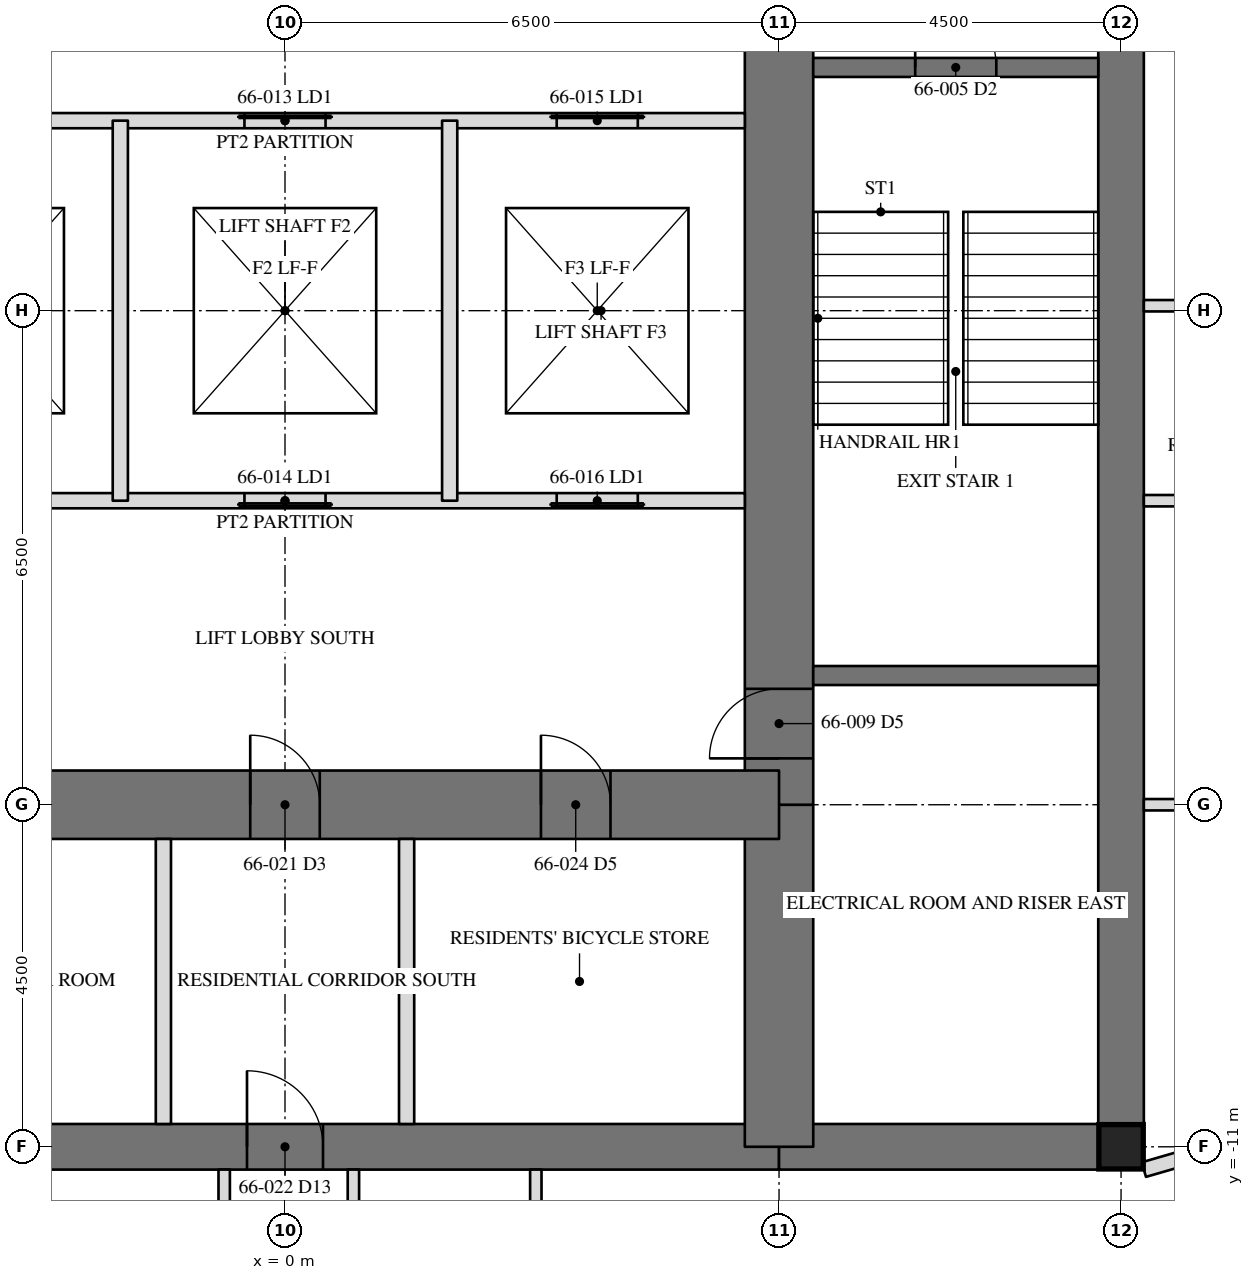
"""IFC4 building model, lengths in metres.
Left out: names, types, materials, properties, quantities, classifications, styles, units other than length and angle.
Written with IfcOpenShell. Run it as: python <this file> out.ifc"""

import sys

from ifc_helpers import new_model, si_unit, direction, frame, frame_2d, origin, origin_2d, place, context, subcontext, project, spatial, rectangle, hollow_rectangle, extrude, element, fill, save


model = new_model("IFC4")
c1 = context("Model", 3, precision=1e-05, world=origin(), true_north=direction((0.0, 1.0)))
c2 = subcontext(c1, "Body", "Model", "MODEL_VIEW")
j1 = project(units=[si_unit("LENGTHUNIT", "METRE"), si_unit("PLANEANGLEUNIT", "RADIAN")], contexts=[c1])
p1 = place(None, origin())
s1 = spatial("IfcSite", under=j1, at=p1, CompositionType="ELEMENT")
p2 = place(p1, origin())
s2 = spatial("IfcBuilding", under=s1, at=p2, CompositionType="ELEMENT")
p3 = place(p2, frame((0.0, 0.0, 270.4)))
s3 = spatial("IfcBuildingStorey", under=s2, at=p3, CompositionType="ELEMENT", Elevation=270.4)
p4 = place(p3, frame((11.0, -11.0, 0.0), z_axis=(0.0, 0.0, 1.0), x_axis=(0.0, 1.0, 0.0)))
e1 = element("IfcWall", 1, at=p4, inside=s3, PredefinedType="SHEAR", context=c2, shape_type="SweptSolid", body=[
    extrude(rectangle(XDim=22.0, YDim=0.6, at=frame_2d((11.0, 0.0))), origin(), (0.0, 0.0, 1.0), 3.6),
])
p5 = place(p4, frame((15.393, 0.0, 0.0)))
e2 = element("IfcOpeningElement", 2, at=p5, cuts=e1, PredefinedType="OPENING", context=c2, shape_type="SweptSolid", body=[
    extrude(rectangle(XDim=0.915, YDim=2.134, at=frame_2d((0.458, 1.067))), frame((0.0, 0.31, 0.0), z_axis=(0.0, -1.0, 0.0), x_axis=(1.0, 0.0, 0.0)), (0.0, 0.0, 1.0), 0.62),
])
p6 = place(p3, frame((-6.5, -11.0, 0.0), z_axis=(0.0, 0.0, 1.0), x_axis=(1.0, 0.0, 0.0)))
e3 = element("IfcWall", 3, at=p6, inside=s3, PredefinedType="SHEAR", context=c2, shape_type="SweptSolid", body=[
    extrude(rectangle(XDim=13.0, YDim=0.6, at=frame_2d((6.5, 0.0))), origin(), (0.0, 0.0, 1.0), 3.6),
])
p7 = place(p6, frame((6.0, 0.0, 0.0)))
e4 = element("IfcOpeningElement", 4, at=p7, cuts=e3, PredefinedType="OPENING", context=c2, shape_type="SweptSolid", body=[
    extrude(rectangle(XDim=1.0, YDim=2.134, at=frame_2d((0.5, 1.067))), frame((0.0, 0.31, 0.0), z_axis=(0.0, -1.0, 0.0), x_axis=(1.0, 0.0, 0.0)), (0.0, 0.0, 1.0), 0.62),
])
p8 = place(p3, frame((6.5, -11.0, 0.0), z_axis=(0.0, 0.0, 1.0), x_axis=(1.0, 0.0, 0.0)))
e5 = element("IfcWall", 5, at=p8, inside=s3, PredefinedType="SHEAR", context=c2, shape_type="SweptSolid", body=[
    extrude(rectangle(XDim=4.5, YDim=0.6, at=frame_2d((2.25, 0.0))), origin(), (0.0, 0.0, 1.0), 3.6),
])
p9 = place(p3, frame((6.5, -11.0, 0.0), z_axis=(0.0, 0.0, 1.0), x_axis=(0.0, 1.0, 0.0)))
e6 = element("IfcWall", 6, at=p9, inside=s3, PredefinedType="SHEAR", context=c2, shape_type="SweptSolid", body=[
    extrude(rectangle(XDim=4.5, YDim=0.9, at=frame_2d((2.25, 0.0))), origin(), (0.0, 0.0, 1.0), 3.6),
])
p10 = place(p3, frame((6.5, -6.5, 0.0), z_axis=(0.0, 0.0, 1.0), x_axis=(0.0, 1.0, 0.0)))
e7 = element("IfcWall", 7, at=p10, inside=s3, PredefinedType="SHEAR", context=c2, shape_type="SweptSolid", body=[
    extrude(rectangle(XDim=13.0, YDim=0.9, at=frame_2d((6.5, 0.0))), origin(), (0.0, 0.0, 1.0), 3.6),
])
p11 = place(p10, frame((10.893, 0.0, 0.0)))
e8 = element("IfcOpeningElement", 8, at=p11, cuts=e7, PredefinedType="OPENING", context=c2, shape_type="SweptSolid", body=[
    extrude(rectangle(XDim=0.915, YDim=2.134, at=frame_2d((0.458, 1.067))), frame((0.0, 0.46, 0.0), z_axis=(0.0, -1.0, 0.0), x_axis=(1.0, 0.0, 0.0)), (0.0, 0.0, 1.0), 0.92),
])
p12 = place(p10, frame((0.61, 0.0, 0.0)))
e9 = element("IfcOpeningElement", 9, at=p12, cuts=e7, PredefinedType="OPENING", context=c2, shape_type="SweptSolid", body=[
    extrude(rectangle(XDim=0.915, YDim=2.134, at=frame_2d((0.458, 1.067))), frame((0.0, 0.46, 0.0), z_axis=(0.0, -1.0, 0.0), x_axis=(1.0, 0.0, 0.0)), (0.0, 0.0, 1.0), 0.92),
])
p13 = place(p3, frame((-6.5, -6.5, 0.0), z_axis=(0.0, 0.0, 1.0), x_axis=(1.0, 0.0, 0.0)))
e10 = element("IfcWall", 10, at=p13, inside=s3, PredefinedType="SHEAR", context=c2, shape_type="SweptSolid", body=[
    extrude(rectangle(XDim=13.0, YDim=0.9, at=frame_2d((6.5, 0.0))), origin(), (0.0, 0.0, 1.0), 3.6),
])
p14 = place(p13, frame((6.042, 0.0, 0.0)))
e11 = element("IfcOpeningElement", 11, at=p14, cuts=e10, PredefinedType="OPENING", context=c2, shape_type="SweptSolid", body=[
    extrude(rectangle(XDim=0.915, YDim=2.134, at=frame_2d((0.458, 1.067))), frame((0.0, 0.46, 0.0), z_axis=(0.0, -1.0, 0.0), x_axis=(1.0, 0.0, 0.0)), (0.0, 0.0, 1.0), 0.92),
])
p15 = place(p13, frame((2.218, 0.0, 0.0)))
e12 = element("IfcOpeningElement", 12, at=p15, cuts=e10, PredefinedType="OPENING", context=c2, shape_type="SweptSolid", body=[
    extrude(rectangle(XDim=0.915, YDim=2.134, at=frame_2d((0.458, 1.067))), frame((0.0, 0.46, 0.0), z_axis=(0.0, -1.0, 0.0), x_axis=(1.0, 0.0, 0.0)), (0.0, 0.0, 1.0), 0.92),
])
p16 = place(p13, frame((9.867, 0.0, 0.0)))
e13 = element("IfcOpeningElement", 13, at=p16, cuts=e10, PredefinedType="OPENING", context=c2, shape_type="SweptSolid", body=[
    extrude(rectangle(XDim=0.915, YDim=2.134, at=frame_2d((0.458, 1.067))), frame((0.0, 0.46, 0.0), z_axis=(0.0, -1.0, 0.0), x_axis=(1.0, 0.0, 0.0)), (0.0, 0.0, 1.0), 0.92),
])
p17 = place(p3, frame((11.0, -11.0, 0.0), z_axis=(0.0, 0.0, 1.0), x_axis=(1.0, 0.0, 0.0)))
e14 = element("IfcColumn", 14, at=p17, inside=s3, PredefinedType="COLUMN", context=c2, shape_type="SweptSolid", body=[
    extrude(hollow_rectangle(XDim=0.584, YDim=0.584, WallThickness=0.051, at=origin_2d()), origin(), (0.0, 0.0, 1.0), 3.6),
])
p18 = place(p3, frame((6.95, -4.8, 0.0), z_axis=(0.0, 0.0, 1.0), x_axis=(1.0, 0.0, 0.0)))
e15 = element("IfcWall", 15, at=p18, inside=s3, PredefinedType="SOLIDWALL", context=c2, shape_type="SweptSolid", body=[
    extrude(rectangle(XDim=3.75, YDim=0.25, at=frame_2d((1.875, 0.0))), origin(), (0.0, 0.0, 1.0), 3.41),
])
p19 = place(p3, frame((6.95, 3.2, 0.0), z_axis=(0.0, 0.0, 1.0), x_axis=(1.0, 0.0, 0.0)))
e16 = element("IfcWall", 16, at=p19, inside=s3, PredefinedType="SOLIDWALL", context=c2, shape_type="SweptSolid", body=[
    extrude(rectangle(XDim=3.75, YDim=0.25, at=frame_2d((1.875, 0.0))), origin(), (0.0, 0.0, 1.0), 3.41),
])
p20 = place(p19, frame((1.342, 0.0, 0.0)))
e17 = element("IfcOpeningElement", 17, at=p20, cuts=e16, PredefinedType="OPENING", context=c2, shape_type="SweptSolid", body=[
    extrude(rectangle(XDim=1.067, YDim=2.134, at=frame_2d((0.533, 1.067))), frame((0.0, 0.135, 0.0), z_axis=(0.0, -1.0, 0.0), x_axis=(1.0, 0.0, 0.0)), (0.0, 0.0, 1.0), 0.27),
])
p21 = place(p3, frame((-6.05, 2.5, 0.0), z_axis=(0.0, 0.0, 1.0), x_axis=(1.0, 0.0, 0.0)))
e18 = element("IfcWall", 18, at=p21, inside=s3, PredefinedType="PARTITIONING", context=c2, shape_type="SweptSolid", body=[
    extrude(rectangle(XDim=12.1, YDim=0.2, at=frame_2d((6.05, 0.0))), origin(), (0.0, 0.0, 1.0), 3.41),
])
p22 = place(p21, frame((1.408, 0.0, 0.0)))
e19 = element("IfcOpeningElement", 19, at=p22, cuts=e18, PredefinedType="OPENING", context=c2, shape_type="SweptSolid", body=[
    extrude(rectangle(XDim=1.067, YDim=2.134, at=frame_2d((0.533, 1.067))), frame((0.0, 0.11, 0.0), z_axis=(0.0, -1.0, 0.0), x_axis=(1.0, 0.0, 0.0)), (0.0, 0.0, 1.0), 0.22),
])
p23 = place(p21, frame((5.517, 0.0, 0.0)))
e20 = element("IfcOpeningElement", 20, at=p23, cuts=e18, PredefinedType="OPENING", context=c2, shape_type="SweptSolid", body=[
    extrude(rectangle(XDim=1.067, YDim=2.134, at=frame_2d((0.533, 1.067))), frame((0.0, 0.11, 0.0), z_axis=(0.0, -1.0, 0.0), x_axis=(1.0, 0.0, 0.0)), (0.0, 0.0, 1.0), 0.22),
])
p24 = place(p21, frame((9.625, 0.0, 0.0)))
e21 = element("IfcOpeningElement", 21, at=p24, cuts=e18, PredefinedType="OPENING", context=c2, shape_type="SweptSolid", body=[
    extrude(rectangle(XDim=1.067, YDim=2.134, at=frame_2d((0.533, 1.067))), frame((0.0, 0.11, 0.0), z_axis=(0.0, -1.0, 0.0), x_axis=(1.0, 0.0, 0.0)), (0.0, 0.0, 1.0), 0.22),
])
p25 = place(p3, frame((6.05, -2.5, 0.0), z_axis=(0.0, 0.0, 1.0), x_axis=(-1.0, 0.0, 0.0)))
e22 = element("IfcWall", 22, at=p25, inside=s3, PredefinedType="PARTITIONING", context=c2, shape_type="SweptSolid", body=[
    extrude(rectangle(XDim=12.1, YDim=0.2, at=frame_2d((6.05, 0.0))), origin(), (0.0, 0.0, 1.0), 3.41),
])
p26 = place(p25, frame((9.625, 0.0, 0.0)))
e23 = element("IfcOpeningElement", 23, at=p26, cuts=e22, PredefinedType="OPENING", context=c2, shape_type="SweptSolid", body=[
    extrude(rectangle(XDim=1.067, YDim=2.134, at=frame_2d((0.533, 1.067))), frame((0.0, 0.11, 0.0), z_axis=(0.0, -1.0, 0.0), x_axis=(1.0, 0.0, 0.0)), (0.0, 0.0, 1.0), 0.22),
])
p27 = place(p25, frame((5.517, 0.0, 0.0)))
e24 = element("IfcOpeningElement", 24, at=p27, cuts=e22, PredefinedType="OPENING", context=c2, shape_type="SweptSolid", body=[
    extrude(rectangle(XDim=1.067, YDim=2.134, at=frame_2d((0.533, 1.067))), frame((0.0, 0.11, 0.0), z_axis=(0.0, -1.0, 0.0), x_axis=(1.0, 0.0, 0.0)), (0.0, 0.0, 1.0), 0.22),
])
p28 = place(p25, frame((1.408, 0.0, 0.0)))
e25 = element("IfcOpeningElement", 25, at=p28, cuts=e22, PredefinedType="OPENING", context=c2, shape_type="SweptSolid", body=[
    extrude(rectangle(XDim=1.067, YDim=2.134, at=frame_2d((0.533, 1.067))), frame((0.0, 0.11, 0.0), z_axis=(0.0, -1.0, 0.0), x_axis=(1.0, 0.0, 0.0)), (0.0, 0.0, 1.0), 0.22),
])
for number, where, z_axis, x_axis in (
    (26, (-2.167, -2.5, 0.0), (0.0, 0.0, 1.0), (0.0, 1.0, 0.0)),
    (27, (2.167, -2.5, 0.0), (0.0, 0.0, 1.0), (0.0, 1.0, 0.0)),
):
    element("IfcWall", number, at=place(p3, frame(where, z_axis=z_axis, x_axis=x_axis)), inside=s3, PredefinedType="PARTITIONING", context=c2, shape_type="SweptSolid", body=[
        extrude(rectangle(XDim=5.0, YDim=0.2, at=frame_2d((2.5, 0.0))), origin(), (0.0, 0.0, 1.0), 3.41),
    ])
for number, where, z_axis, x_axis in (
    (28, (-1.6, -6.95, 0.0), (0.0, 0.0, 1.0), (0.0, -1.0, 0.0)),
    (29, (1.6, -6.95, 0.0), (0.0, 0.0, 1.0), (0.0, -1.0, 0.0)),
):
    element("IfcWall", number, at=place(p3, frame(where, z_axis=z_axis, x_axis=x_axis)), inside=s3, PredefinedType="PARTITIONING", context=c2, shape_type="SweptSolid", body=[
        extrude(rectangle(XDim=3.75, YDim=0.2, at=frame_2d((1.875, 0.0))), origin(), (0.0, 0.0, 1.0), 3.41),
    ])
p29 = place(p3, frame((11.3, -11.3, 0.0), z_axis=(0.0, 0.0, 1.0), x_axis=(0.960552344683, 0.278099250491, 0.0)))
e30 = element("IfcWall", 30, at=p29, inside=s3, PredefinedType="PARTITIONING", context=c2, shape_type="SweptSolid", body=[
    extrude(rectangle(XDim=1.584, YDim=0.2, at=frame_2d((0.792, 0.0))), origin(), (0.0, 0.0, 1.0), 3.41),
])
p30 = place(p3, frame((11.3, -6.5, 0.0), z_axis=(0.0, 0.0, 1.0), x_axis=(1.0, 0.0, 0.0)))
e31 = element("IfcWall", 31, at=p30, inside=s3, PredefinedType="PARTITIONING", context=c2, shape_type="SweptSolid", body=[
    extrude(rectangle(XDim=5.615, YDim=0.15, at=frame_2d((2.808, 0.0))), origin(), (0.0, 0.0, 1.0), 2.966),
])
p31 = place(p30, frame((2.742, 0.0, 0.0)))
e32 = element("IfcOpeningElement", 32, at=p31, cuts=e31, PredefinedType="OPENING", context=c2, shape_type="SweptSolid", body=[
    extrude(rectangle(XDim=0.915, YDim=2.134, at=frame_2d((0.458, 1.067))), frame((0.0, 0.085, 0.0), z_axis=(0.0, -1.0, 0.0), x_axis=(1.0, 0.0, 0.0)), (0.0, 0.0, 1.0), 0.17),
])
p32 = place(p3, frame((11.3, 0.065, 0.0), z_axis=(0.0, 0.0, 1.0), x_axis=(1.0, 0.0, 0.0)))
e33 = element("IfcWall", 33, at=p32, inside=s3, PredefinedType="PARTITIONING", context=c2, shape_type="SweptSolid", body=[
    extrude(rectangle(XDim=5.615, YDim=0.15, at=frame_2d((2.808, 0.0))), origin(), (0.0, 0.0, 1.0), 2.709),
])
p33 = place(p32, frame((3.242, 0.0, 0.0)))
e34 = element("IfcOpeningElement", 34, at=p33, cuts=e33, PredefinedType="OPENING", context=c2, shape_type="SweptSolid", body=[
    extrude(rectangle(XDim=0.915, YDim=2.134, at=frame_2d((0.458, 1.067))), frame((0.0, 0.085, 0.0), z_axis=(0.0, -1.0, 0.0), x_axis=(1.0, 0.0, 0.0)), (0.0, 0.0, 1.0), 0.17),
])
p34 = place(p3, frame((11.3, -2.5, 0.0), z_axis=(0.0, 0.0, 1.0), x_axis=(1.0, 0.0, 0.0)))
e35 = element("IfcWall", 35, at=p34, inside=s3, PredefinedType="PARTITIONING", context=c2, shape_type="SweptSolid", body=[
    extrude(rectangle(XDim=2.375, YDim=0.15, at=frame_2d((1.188, 0.0))), origin(), (0.0, 0.0, 1.0), 3.41),
])
p35 = place(p3, frame((0.9, -11.3, 0.0), z_axis=(0.0, 0.0, 1.0), x_axis=(0.0, -1.0, 0.0)))
e36 = element("IfcWall", 36, at=p35, inside=s3, PredefinedType="PARTITIONING", context=c2, shape_type="SweptSolid", body=[
    extrude(rectangle(XDim=2.725, YDim=0.15, at=frame_2d((1.362, 0.0))), origin(), (0.0, 0.0, 1.0), 3.41),
])
p36 = place(p3, frame((3.3, -11.3, 0.0), z_axis=(0.0, 0.0, 1.0), x_axis=(0.0, -1.0, 0.0)))
e37 = element("IfcWall", 37, at=p36, inside=s3, PredefinedType="PARTITIONING", context=c2, shape_type="SweptSolid", body=[
    extrude(rectangle(XDim=2.725, YDim=0.15, at=frame_2d((1.362, 0.0))), origin(), (0.0, 0.0, 1.0), 2.709),
])
p37 = place(p3, frame((-0.8, -11.3, 0.0), z_axis=(0.0, 0.0, 1.0), x_axis=(0.0, -1.0, 0.0)))
e38 = element("IfcWall", 38, at=p37, inside=s3, PredefinedType="PARTITIONING", context=c2, shape_type="SweptSolid", body=[
    extrude(rectangle(XDim=2.375, YDim=0.15, at=frame_2d((1.188, 0.0))), origin(), (0.0, 0.0, 1.0), 3.41),
])
p38 = place(p20, origin())
e39 = element("IfcDoor", 39, at=p38, inside=s3, OperationType="SINGLE_SWING_LEFT", PredefinedType="DOOR", context=c2, shape_type="SweptSolid", body=[
    extrude(rectangle(XDim=1.067, YDim=2.134, at=frame_2d((0.533, 1.067))), frame((0.0, 0.025, 0.0), z_axis=(0.0, -1.0, 0.0), x_axis=(1.0, 0.0, 0.0)), (0.0, 0.0, 1.0), 0.05),
])
fill(e17, e39)
p39 = place(p12, origin())
e40 = element("IfcDoor", 40, at=p39, inside=s3, OperationType="SINGLE_SWING_RIGHT", PredefinedType="DOOR", context=c2, shape_type="SweptSolid", body=[
    extrude(rectangle(XDim=0.915, YDim=2.134, at=frame_2d((0.458, 1.067))), frame((0.0, -0.375, 0.0), z_axis=(0.0, -1.0, 0.0), x_axis=(1.0, 0.0, 0.0)), (0.0, 0.0, 1.0), 0.05),
])
fill(e9, e40)
p40 = place(p23, origin())
e41 = element("IfcDoor", 41, at=p40, inside=s3, OperationType="SLIDING_TO_LEFT", PredefinedType="DOOR", context=c2, shape_type="SweptSolid", body=[
    extrude(rectangle(XDim=1.067, YDim=2.134, at=frame_2d((0.533, 1.067))), frame((0.0, 0.025, 0.0), z_axis=(0.0, -1.0, 0.0), x_axis=(1.0, 0.0, 0.0)), (0.0, 0.0, 1.0), 0.05),
])
fill(e20, e41)
p41 = place(p27, origin())
e42 = element("IfcDoor", 42, at=p41, inside=s3, OperationType="SLIDING_TO_LEFT", PredefinedType="DOOR", context=c2, shape_type="SweptSolid", body=[
    extrude(rectangle(XDim=1.067, YDim=2.134, at=frame_2d((0.533, 1.067))), frame((0.0, 0.025, 0.0), z_axis=(0.0, -1.0, 0.0), x_axis=(1.0, 0.0, 0.0)), (0.0, 0.0, 1.0), 0.05),
])
fill(e24, e42)
p42 = place(p24, origin())
e43 = element("IfcDoor", 43, at=p42, inside=s3, OperationType="SLIDING_TO_LEFT", PredefinedType="DOOR", context=c2, shape_type="SweptSolid", body=[
    extrude(rectangle(XDim=1.067, YDim=2.134, at=frame_2d((0.533, 1.067))), frame((0.0, 0.025, 0.0), z_axis=(0.0, -1.0, 0.0), x_axis=(1.0, 0.0, 0.0)), (0.0, 0.0, 1.0), 0.05),
])
fill(e21, e43)
p43 = place(p28, origin())
e44 = element("IfcDoor", 44, at=p43, inside=s3, OperationType="SLIDING_TO_LEFT", PredefinedType="DOOR", context=c2, shape_type="SweptSolid", body=[
    extrude(rectangle(XDim=1.067, YDim=2.134, at=frame_2d((0.533, 1.067))), frame((0.0, 0.025, 0.0), z_axis=(0.0, -1.0, 0.0), x_axis=(1.0, 0.0, 0.0)), (0.0, 0.0, 1.0), 0.05),
])
fill(e25, e44)
p44 = place(p14, origin())
e45 = element("IfcDoor", 45, at=p44, inside=s3, OperationType="SINGLE_SWING_RIGHT", PredefinedType="DOOR", context=c2, shape_type="SweptSolid", body=[
    extrude(rectangle(XDim=0.915, YDim=2.134, at=frame_2d((0.458, 1.067))), frame((0.0, -0.375, 0.0), z_axis=(0.0, -1.0, 0.0), x_axis=(1.0, 0.0, 0.0)), (0.0, 0.0, 1.0), 0.05),
])
fill(e11, e45)
p45 = place(p7, origin())
e46 = element("IfcDoor", 46, at=p45, inside=s3, OperationType="SINGLE_SWING_RIGHT", PredefinedType="DOOR", context=c2, shape_type="SweptSolid", body=[
    extrude(rectangle(XDim=1.0, YDim=2.134, at=frame_2d((0.5, 1.067))), frame((0.0, -0.225, 0.0), z_axis=(0.0, -1.0, 0.0), x_axis=(1.0, 0.0, 0.0)), (0.0, 0.0, 1.0), 0.05),
])
fill(e4, e46)
p46 = place(p16, origin())
e47 = element("IfcDoor", 47, at=p46, inside=s3, OperationType="SINGLE_SWING_RIGHT", PredefinedType="DOOR", context=c2, shape_type="SweptSolid", body=[
    extrude(rectangle(XDim=0.915, YDim=2.134, at=frame_2d((0.458, 1.067))), frame((0.0, -0.375, 0.0), z_axis=(0.0, -1.0, 0.0), x_axis=(1.0, 0.0, 0.0)), (0.0, 0.0, 1.0), 0.05),
])
fill(e13, e47)
save(model, sys.argv[1])
